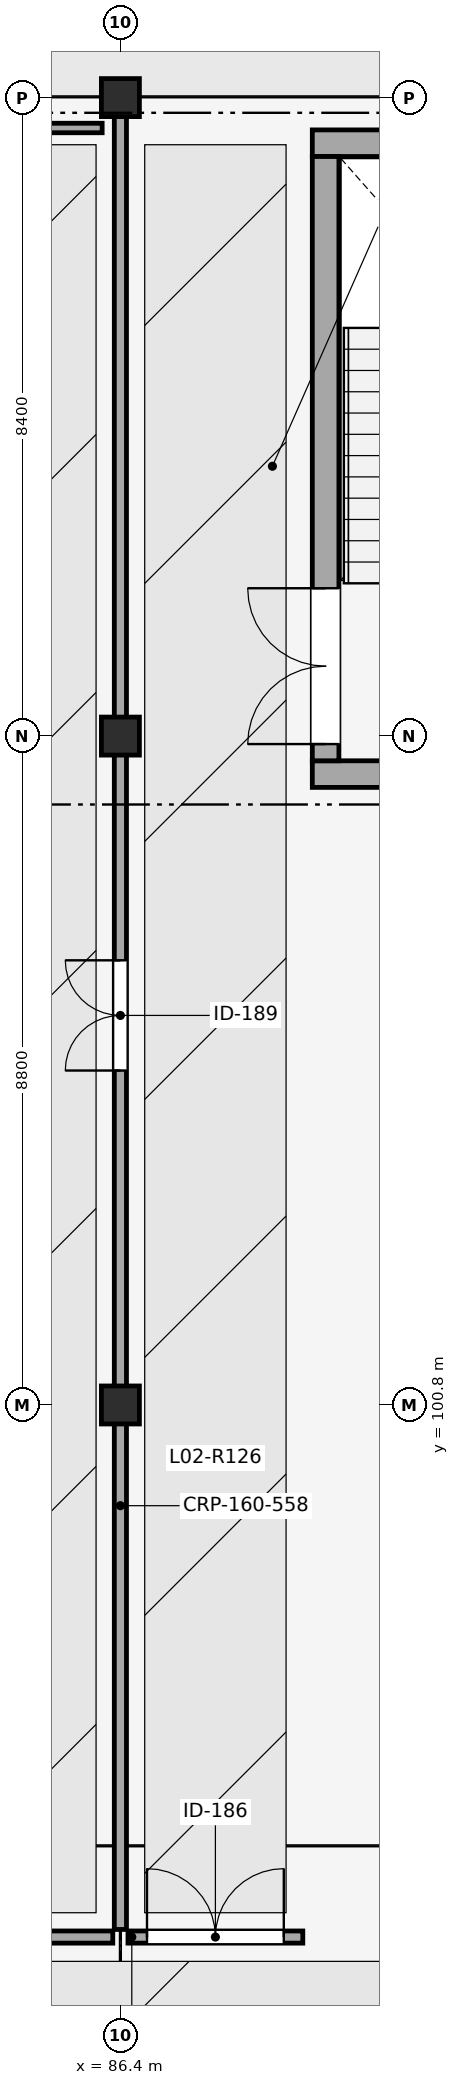
"""IFC4 building model, lengths in metres.
Left out: names, types, materials, properties, quantities, classifications, styles, units other than length and angle.
Written with IfcOpenShell. Run it as: python <this file> out.ifc"""

import sys

from ifc_helpers import new_model, si_unit, direction, frame, frame_2d, origin, origin_2d, place, context, subcontext, project, spatial, rectangle, extrude, element, fill, save


model = new_model("IFC4")
c1 = context("Model", 3, precision=1e-05, world=origin(), true_north=direction((0.0, 1.0)))
c2 = subcontext(c1, "Body", "Model", "MODEL_VIEW")
j1 = project(units=[si_unit("LENGTHUNIT", "METRE"), si_unit("PLANEANGLEUNIT", "RADIAN")], contexts=[c1])
p1 = place(None, origin())
s1 = spatial("IfcSite", under=j1, at=p1, CompositionType="ELEMENT")
p2 = place(p1, origin())
s2 = spatial("IfcBuilding", under=s1, at=p2, CompositionType="ELEMENT")
p3 = place(p2, frame((0.0, 0.0, 9.6)))
s3 = spatial("IfcBuildingStorey", under=s2, at=p3, CompositionType="ELEMENT", Elevation=9.6)
for number, where, z_axis, x_axis in (
    (1, (86.4, 100.8, 0.0), (0.0, 0.0, 1.0), (1.0, 0.0, 0.0)),
    (2, (86.4, 109.6, 0.0), (0.0, 0.0, 1.0), (1.0, 0.0, 0.0)),
    (3, (86.4, 118.0, 0.0), (0.0, 0.0, 1.0), (1.0, 0.0, 0.0)),
):
    element("IfcColumn", number, at=place(p3, frame(where, z_axis=z_axis, x_axis=x_axis)), inside=s3, PredefinedType="COLUMN", context=c2, shape_type="SweptSolid", body=[
        extrude(rectangle(XDim=0.5, YDim=0.5, at=origin_2d()), origin(), (0.0, 0.0, 1.0), 4.5),
    ])
for number, where, z_axis, x_axis in (
    (4, (94.575, 109.1, 0.0), (0.0, 0.0, 1.0), (-1.0, 0.0, 0.0)),
    (5, (88.925, 117.4, 0.0), (0.0, 0.0, 1.0), (1.0, 0.0, 0.0)),
):
    element("IfcWall", number, at=place(p3, frame(where, z_axis=z_axis, x_axis=x_axis)), inside=s3, PredefinedType="SHEAR", context=c2, shape_type="SweptSolid", body=[
        extrude(rectangle(XDim=5.65, YDim=0.35, at=frame_2d((2.825, 0.0))), origin(), (0.0, 0.0, 1.0), 4.25),
    ])
p4 = place(p3, frame((89.1, 109.275, 0.0), z_axis=(0.0, 0.0, 1.0), x_axis=(0.0, 1.0, 0.0)))
e6 = element("IfcWall", 6, at=p4, inside=s3, PredefinedType="SHEAR", context=c2, shape_type="SweptSolid", body=[
    extrude(rectangle(XDim=7.95, YDim=0.35, at=frame_2d((3.975, 0.0))), origin(), (0.0, 0.0, 1.0), 4.25),
])
p5 = place(p4, frame((0.22, 0.0, 0.0)))
e7 = element("IfcOpeningElement", 7, at=p5, cuts=e6, PredefinedType="OPENING", context=c2, shape_type="SweptSolid", body=[
    extrude(rectangle(XDim=2.05, YDim=2.15, at=frame_2d((1.025, 1.075))), frame((0.0, 0.185, 0.0), z_axis=(0.0, -1.0, 0.0), x_axis=(1.0, 0.0, 0.0)), (0.0, 0.0, 1.0), 0.37),
])
p6 = place(p3, frame((86.5, 93.8, 0.0), z_axis=(0.0, 0.0, 1.0), x_axis=(1.0, 0.0, 0.0)))
e8 = element("IfcWall", 8, at=p6, inside=s3, PredefinedType="PARTITIONING", context=c2, shape_type="SweptSolid", body=[
    extrude(rectangle(XDim=2.3, YDim=0.16, at=frame_2d((1.15, 0.0))), origin(), (0.0, 0.0, 1.0), 3.4),
])
p7 = place(p6, frame((0.25, 0.0, 0.0)))
e9 = element("IfcOpeningElement", 9, at=p7, cuts=e8, PredefinedType="OPENING", context=c2, shape_type="SweptSolid", body=[
    extrude(rectangle(XDim=1.8, YDim=2.15, at=frame_2d((0.9, 1.075))), frame((0.0, 0.09, 0.0), z_axis=(0.0, -1.0, 0.0), x_axis=(1.0, 0.0, 0.0)), (0.0, 0.0, 1.0), 0.18),
])
p8 = place(p3, frame((48.05, 93.8, 0.0), z_axis=(0.0, 0.0, 1.0), x_axis=(1.0, 0.0, 0.0)))
e10 = element("IfcWall", 10, at=p8, inside=s3, PredefinedType="PARTITIONING", context=c2, shape_type="SweptSolid", body=[
    extrude(rectangle(XDim=38.25, YDim=0.16, at=frame_2d((19.125, 0.0))), origin(), (0.0, 0.0, 1.0), 3.4),
])
p9 = place(p8, frame((18.4, 0.0, 0.0)))
e11 = element("IfcOpeningElement", 11, at=p9, cuts=e10, PredefinedType="OPENING", context=c2, shape_type="SweptSolid", body=[
    extrude(rectangle(XDim=1.45, YDim=2.2, at=frame_2d((0.725, 1.1))), frame((0.0, 0.09, 0.0), z_axis=(0.0, -1.0, 0.0), x_axis=(1.0, 0.0, 0.0)), (0.0, 0.0, 1.0), 0.18),
])
p10 = place(p3, frame((86.4, 93.9, 0.0), z_axis=(0.0, 0.0, 1.0), x_axis=(0.0, 1.0, 0.0)))
e12 = element("IfcWall", 12, at=p10, inside=s3, PredefinedType="PARTITIONING", context=c2, shape_type="SweptSolid", body=[
    extrude(rectangle(XDim=24.05, YDim=0.16, at=frame_2d((12.025, 0.0))), origin(), (0.0, 0.0, 1.0), 3.4),
])
p11 = place(p10, frame((11.3, 0.0, 0.0)))
e13 = element("IfcOpeningElement", 13, at=p11, cuts=e12, PredefinedType="OPENING", context=c2, shape_type="SweptSolid", body=[
    extrude(rectangle(XDim=1.45, YDim=2.2, at=frame_2d((0.725, 1.1))), frame((0.0, 0.09, 0.0), z_axis=(0.0, -1.0, 0.0), x_axis=(1.0, 0.0, 0.0)), (0.0, 0.0, 1.0), 0.18),
])
p12 = place(p3, frame((48.05, 117.6, 0.0), z_axis=(0.0, 0.0, 1.0), x_axis=(1.0, 0.0, 0.0)))
e14 = element("IfcWall", 14, at=p12, inside=s3, PredefinedType="PARTITIONING", context=c2, shape_type="SweptSolid", body=[
    extrude(rectangle(XDim=38.11, YDim=0.125, at=frame_2d((19.055, 0.0))), origin(), (0.0, 0.0, 1.0), 3.4),
])
p13 = place(p5, origin())
e15 = element("IfcDoor", 15, at=p13, inside=s3, OperationType="DOUBLE_DOOR_SINGLE_SWING", PredefinedType="DOOR", context=c2, shape_type="SweptSolid", body=[
    extrude(rectangle(XDim=2.05, YDim=2.15, at=frame_2d((1.025, 1.075))), frame((0.0, 0.025, 0.0), z_axis=(0.0, -1.0, 0.0), x_axis=(1.0, 0.0, 0.0)), (0.0, 0.0, 1.0), 0.05),
])
fill(e7, e15)
p14 = place(p7, origin())
e16 = element("IfcDoor", 16, at=p14, inside=s3, OperationType="DOUBLE_DOOR_SINGLE_SWING", PredefinedType="DOOR", context=c2, shape_type="SweptSolid", body=[
    extrude(rectangle(XDim=1.8, YDim=2.15, at=frame_2d((0.9, 1.075))), frame((0.0, 0.025, 0.0), z_axis=(0.0, -1.0, 0.0), x_axis=(1.0, 0.0, 0.0)), (0.0, 0.0, 1.0), 0.05),
])
fill(e9, e16)
p15 = place(p11, origin())
e17 = element("IfcDoor", 17, at=p15, inside=s3, OperationType="DOUBLE_DOOR_SINGLE_SWING", PredefinedType="DOOR", context=c2, shape_type="SweptSolid", body=[
    extrude(rectangle(XDim=1.45, YDim=2.2, at=frame_2d((0.725, 1.1))), frame((0.0, 0.025, 0.0), z_axis=(0.0, -1.0, 0.0), x_axis=(1.0, 0.0, 0.0)), (0.0, 0.0, 1.0), 0.05),
])
fill(e13, e17)
save(model, sys.argv[1])
